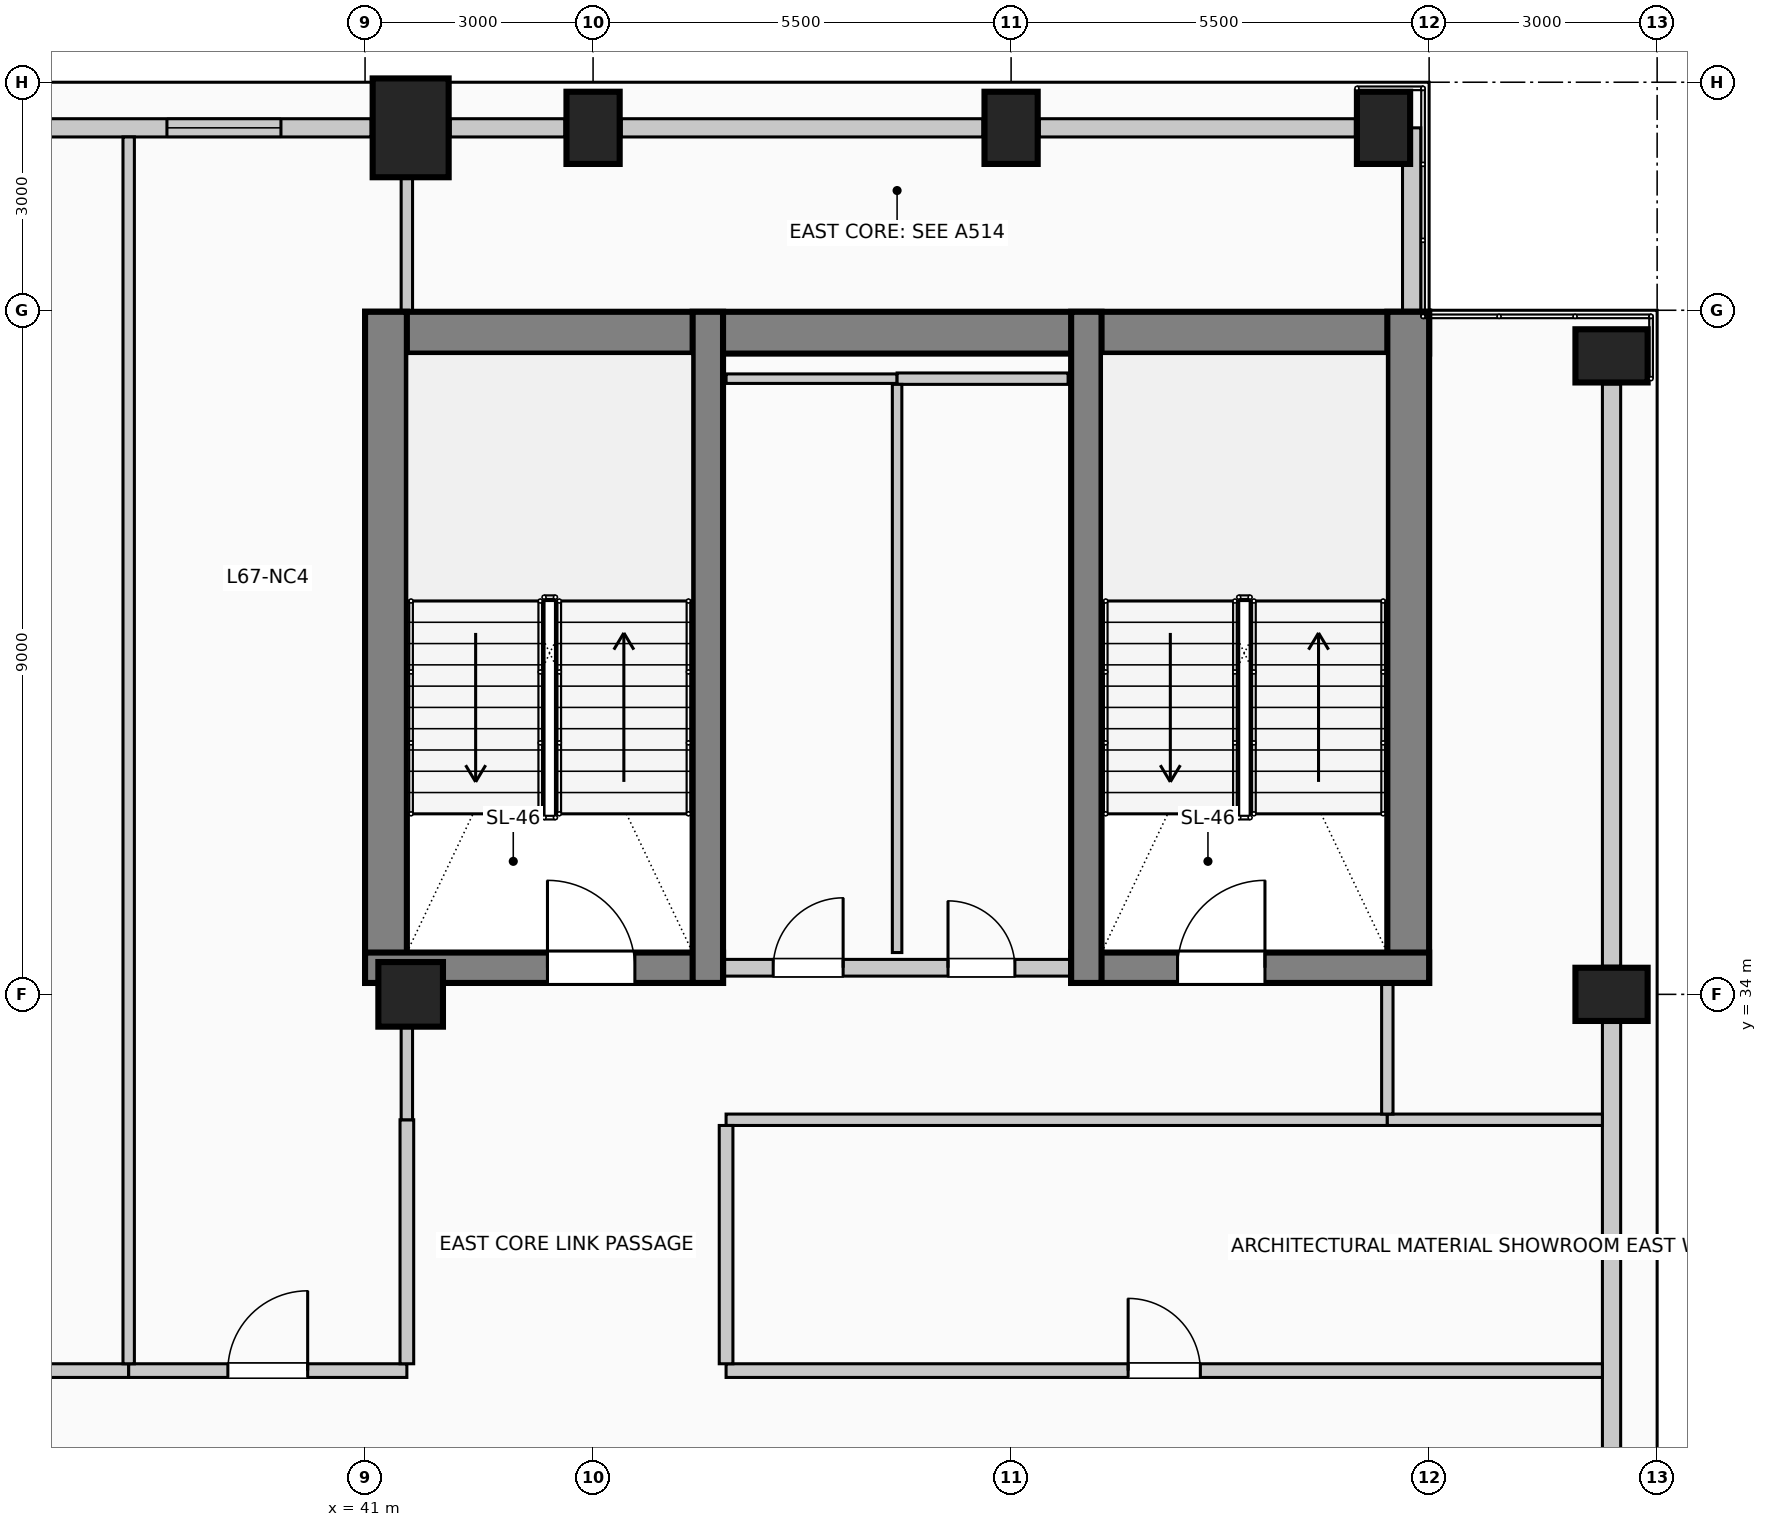
"""IFC4 building model, lengths in metres.
Left out: names, types, materials, properties, quantities, classifications, styles, units other than length and angle.
Written with IfcOpenShell. Run it as: python <this file> out.ifc"""

import sys

from ifc_helpers import new_model, si_unit, direction, frame, frame_2d, origin, origin_2d, place, context, subcontext, project, spatial, rectangle, circle, extrude, element, fill, save


model = new_model("IFC4")
c1 = context("Model", 3, precision=1e-05, world=origin(), true_north=direction((0.0, 1.0)))
c2 = subcontext(c1, "Body", "Model", "MODEL_VIEW")
j1 = project(units=[si_unit("LENGTHUNIT", "METRE"), si_unit("PLANEANGLEUNIT", "RADIAN")], contexts=[c1])
p1 = place(None, origin())
s1 = spatial("IfcSite", under=j1, at=p1, CompositionType="ELEMENT")
p2 = place(p1, origin())
s2 = spatial("IfcBuilding", under=s1, at=p2, CompositionType="ELEMENT")
p3 = place(p2, frame((0.0, 0.0, 276.6)))
s3 = spatial("IfcBuildingStorey", under=s2, at=p3, CompositionType="ELEMENT", Elevation=276.6)
p4 = place(p3, frame((41.0, 42.705, 0.0), z_axis=(0.0, 0.0, 1.0), x_axis=(1.0, 0.0, 0.0)))
e1 = element("IfcWall", 1, at=p4, inside=s3, PredefinedType="SHEAR", context=c2, shape_type="SweptSolid", body=[
    extrude(rectangle(XDim=14.0, YDim=0.55, at=frame_2d((7.0, 0.0))), origin(), (0.0, 0.0, 1.0), 4.0),
])
for number, where, z_axis, x_axis in (
    (2, (41.275, 34.15, 0.0), (0.0, 0.0, 1.0), (0.0, 1.0, 0.0)),
    (3, (54.725, 34.15, 0.0), (0.0, 0.0, 1.0), (0.0, 1.0, 0.0)),
):
    element("IfcWall", number, at=place(p3, frame(where, z_axis=z_axis, x_axis=x_axis)), inside=s3, PredefinedType="SHEAR", context=c2, shape_type="SweptSolid", body=[
        extrude(rectangle(XDim=8.83, YDim=0.55, at=frame_2d((4.415, 0.0))), origin(), (0.0, 0.0, 1.0), 4.0),
    ])
p5 = place(p3, frame((41.0, 34.35, 0.0), z_axis=(0.0, 0.0, 1.0), x_axis=(1.0, 0.0, 0.0)))
e4 = element("IfcWall", 4, at=p5, inside=s3, PredefinedType="SHEAR", context=c2, shape_type="SweptSolid", body=[
    extrude(rectangle(XDim=4.71, YDim=0.4, at=frame_2d((2.355, 0.0))), origin(), (0.0, 0.0, 1.0), 4.0),
])
p6 = place(p5, frame((2.4, 0.0, 0.0)))
e5 = element("IfcOpeningElement", 5, at=p6, cuts=e4, PredefinedType="OPENING", context=c2, shape_type="SweptSolid", body=[
    extrude(rectangle(XDim=1.15, YDim=2.2, at=frame_2d((0.575, 1.1))), frame((0.0, 0.21, 0.0), z_axis=(0.0, -1.0, 0.0), x_axis=(1.0, 0.0, 0.0)), (0.0, 0.0, 1.0), 0.42),
])
p7 = place(p3, frame((45.51, 34.15, 0.0), z_axis=(0.0, 0.0, 1.0), x_axis=(0.0, 1.0, 0.0)))
e6 = element("IfcWall", 6, at=p7, inside=s3, PredefinedType="SHEAR", context=c2, shape_type="SweptSolid", body=[
    extrude(rectangle(XDim=8.83, YDim=0.4, at=frame_2d((4.415, 0.0))), origin(), (0.0, 0.0, 1.0), 4.0),
])
p8 = place(p3, frame((50.29, 34.35, 0.0), z_axis=(0.0, 0.0, 1.0), x_axis=(1.0, 0.0, 0.0)))
e7 = element("IfcWall", 7, at=p8, inside=s3, PredefinedType="SHEAR", context=c2, shape_type="SweptSolid", body=[
    extrude(rectangle(XDim=4.71, YDim=0.4, at=frame_2d((2.355, 0.0))), origin(), (0.0, 0.0, 1.0), 4.0),
])
p9 = place(p8, frame((1.4, 0.0, 0.0)))
e8 = element("IfcOpeningElement", 8, at=p9, cuts=e7, PredefinedType="OPENING", context=c2, shape_type="SweptSolid", body=[
    extrude(rectangle(XDim=1.15, YDim=2.2, at=frame_2d((0.575, 1.1))), frame((0.0, 0.21, 0.0), z_axis=(0.0, -1.0, 0.0), x_axis=(1.0, 0.0, 0.0)), (0.0, 0.0, 1.0), 0.42),
])
p10 = place(p3, frame((50.49, 34.15, 0.0), z_axis=(0.0, 0.0, 1.0), x_axis=(0.0, 1.0, 0.0)))
e9 = element("IfcWall", 9, at=p10, inside=s3, PredefinedType="SHEAR", context=c2, shape_type="SweptSolid", body=[
    extrude(rectangle(XDim=8.83, YDim=0.4, at=frame_2d((4.415, 0.0))), origin(), (0.0, 0.0, 1.0), 4.0),
])
p11 = place(p3, frame((41.6, 45.4, 0.0), z_axis=(0.0, 0.0, 1.0), x_axis=(1.0, 0.0, 0.0)))
e10 = element("IfcColumn", 10, at=p11, inside=s3, PredefinedType="COLUMN", context=c2, shape_type="SweptSolid", body=[
    extrude(rectangle(XDim=1.0, YDim=1.3, at=origin_2d()), origin(), (0.0, 0.0, 1.0), 4.0),
])
for number, where, z_axis, x_axis in (
    (11, (44.0, 45.4, 0.0), (0.0, 0.0, 1.0), (1.0, 0.0, 0.0)),
    (12, (49.5, 45.4, 0.0), (0.0, 0.0, 1.0), (1.0, 0.0, 0.0)),
    (13, (54.4, 45.4, 0.0), (0.0, 0.0, 1.0), (1.0, 0.0, 0.0)),
    (14, (57.4, 34.0, 0.0), (0.0, 0.0, 1.0), (0.0, 1.0, 0.0)),
    (15, (57.4, 42.4, 0.0), (0.0, 0.0, 1.0), (0.0, 1.0, 0.0)),
):
    element("IfcColumn", number, at=place(p3, frame(where, z_axis=z_axis, x_axis=x_axis)), inside=s3, PredefinedType="COLUMN", context=c2, shape_type="SweptSolid", body=[
        extrude(rectangle(XDim=0.7, YDim=0.95, at=origin_2d()), origin(), (0.0, 0.0, 1.0), 4.0),
    ])
p12 = place(p3, frame((41.6, 34.0, 0.0), z_axis=(0.0, 0.0, 1.0), x_axis=(1.0, 0.0, 0.0)))
e16 = element("IfcColumn", 16, at=p12, inside=s3, PredefinedType="COLUMN", context=c2, shape_type="SweptSolid", body=[
    extrude(circle(Radius=0.425, at=origin_2d()), origin(), (0.0, 0.0, 1.0), 4.0),
])
p13 = place(p3, frame((34.52, 45.4, 0.0), z_axis=(0.0, 0.0, 1.0), x_axis=(1.0, 0.0, 0.0)))
e17 = element("IfcWall", 17, at=p13, inside=s3, PredefinedType="SOLIDWALL", context=c2, shape_type="SweptSolid", body=[
    extrude(rectangle(XDim=6.56, YDim=0.24, at=frame_2d((3.28, 0.0))), origin(), (0.0, 0.0, 1.0), 2.91),
])
p14 = place(p13, frame((3.873, 0.0, 0.42)))
e18 = element("IfcOpeningElement", 18, at=p14, cuts=e17, PredefinedType="OPENING", context=c2, shape_type="SweptSolid", body=[
    extrude(rectangle(XDim=1.5, YDim=2.2, at=frame_2d((0.75, 1.1))), frame((0.0, 0.13, 0.0), z_axis=(0.0, -1.0, 0.0), x_axis=(1.0, 0.0, 0.0)), (0.0, 0.0, 1.0), 0.26),
])
p15 = place(p3, frame((42.12, 45.4, 0.0), z_axis=(0.0, 0.0, 1.0), x_axis=(1.0, 0.0, 0.0)))
e19 = element("IfcWall", 19, at=p15, inside=s3, PredefinedType="SOLIDWALL", context=c2, shape_type="SweptSolid", body=[
    extrude(rectangle(XDim=1.51, YDim=0.24, at=frame_2d((0.755, 0.0))), origin(), (0.0, 0.0, 1.0), 2.91),
])
p16 = place(p3, frame((44.37, 45.4, 0.0), z_axis=(0.0, 0.0, 1.0), x_axis=(1.0, 0.0, 0.0)))
e20 = element("IfcWall", 20, at=p16, inside=s3, PredefinedType="SOLIDWALL", context=c2, shape_type="SweptSolid", body=[
    extrude(rectangle(XDim=4.76, YDim=0.24, at=frame_2d((2.38, 0.0))), origin(), (0.0, 0.0, 1.0), 2.91),
])
p17 = place(p3, frame((49.87, 45.4, 0.0), z_axis=(0.0, 0.0, 1.0), x_axis=(1.0, 0.0, 0.0)))
e21 = element("IfcWall", 21, at=p17, inside=s3, PredefinedType="SOLIDWALL", context=c2, shape_type="SweptSolid", body=[
    extrude(rectangle(XDim=4.16, YDim=0.24, at=frame_2d((2.08, 0.0))), origin(), (0.0, 0.0, 1.0), 2.91),
])
p18 = place(p3, frame((57.4, 33.63, 0.0), z_axis=(0.0, 0.0, 1.0), x_axis=(0.0, -1.0, 0.0)))
e22 = element("IfcWall", 22, at=p18, inside=s3, PredefinedType="SOLIDWALL", context=c2, shape_type="SweptSolid", body=[
    extrude(rectangle(XDim=7.26, YDim=0.24, at=frame_2d((3.63, 0.0))), origin(), (0.0, 0.0, 1.0), 2.91),
])
p19 = place(p3, frame((57.4, 42.03, 0.0), z_axis=(0.0, 0.0, 1.0), x_axis=(0.0, -1.0, 0.0)))
e23 = element("IfcWall", 23, at=p19, inside=s3, PredefinedType="SOLIDWALL", context=c2, shape_type="SweptSolid", body=[
    extrude(rectangle(XDim=7.66, YDim=0.24, at=frame_2d((3.83, 0.0))), origin(), (0.0, 0.0, 1.0), 2.91),
])
p20 = place(p3, frame((54.77, 45.4, 0.0), z_axis=(0.0, 0.0, 1.0), x_axis=(0.0, -1.0, 0.0)))
e24 = element("IfcWall", 24, at=p20, inside=s3, PredefinedType="SOLIDWALL", context=c2, shape_type="SweptSolid", body=[
    extrude(rectangle(XDim=2.415, YDim=0.24, at=frame_2d((1.208, 0.0))), origin(), (0.0, 0.0, 1.0), 3.66),
])
p21 = place(p3, frame((45.72, 34.35, 0.0), z_axis=(0.0, 0.0, 1.0), x_axis=(1.0, 0.0, 0.0)))
e25 = element("IfcWall", 25, at=p21, inside=s3, PredefinedType="PARTITIONING", context=c2, shape_type="SweptSolid", body=[
    extrude(rectangle(XDim=4.56, YDim=0.22, at=frame_2d((2.28, 0.0))), origin(), (0.0, 0.0, 1.0), 3.66),
])
p22 = place(p21, frame((0.65, 0.0, 0.0)))
e26 = element("IfcOpeningElement", 26, at=p22, cuts=e25, PredefinedType="OPENING", context=c2, shape_type="SweptSolid", body=[
    extrude(rectangle(XDim=0.92, YDim=2.1, at=frame_2d((0.46, 1.05))), frame((0.0, 0.12, 0.0), z_axis=(0.0, -1.0, 0.0), x_axis=(1.0, 0.0, 0.0)), (0.0, 0.0, 1.0), 0.24),
])
p23 = place(p21, frame((2.95, 0.0, 0.0)))
e27 = element("IfcOpeningElement", 27, at=p23, cuts=e25, PredefinedType="OPENING", context=c2, shape_type="SweptSolid", body=[
    extrude(rectangle(XDim=0.88, YDim=2.1, at=frame_2d((0.44, 1.05))), frame((0.0, 0.12, 0.0), z_axis=(0.0, -1.0, 0.0), x_axis=(1.0, 0.0, 0.0)), (0.0, 0.0, 1.0), 0.24),
])
p24 = place(p3, frame((32.33, 29.05, 0.0), z_axis=(0.0, 0.0, 1.0), x_axis=(1.0, 0.0, 0.0)))
e28 = element("IfcWall", 28, at=p24, inside=s3, PredefinedType="PARTITIONING", context=c2, shape_type="SweptSolid", body=[
    extrude(rectangle(XDim=5.56, YDim=0.18, at=frame_2d((2.78, 0.0))), origin(), (0.0, 0.0, 1.0), 3.66),
])
p25 = place(p24, frame((2.305, 0.0, 0.0)))
e29 = element("IfcOpeningElement", 29, at=p25, cuts=e28, PredefinedType="OPENING", context=c2, shape_type="SweptSolid", body=[
    extrude(rectangle(XDim=0.95, YDim=2.15, at=frame_2d((0.475, 1.075))), frame((0.0, 0.1, 0.0), z_axis=(0.0, -1.0, 0.0), x_axis=(1.0, 0.0, 0.0)), (0.0, 0.0, 1.0), 0.2),
])
p26 = place(p3, frame((37.89, 29.05, 0.0), z_axis=(0.0, 0.0, 1.0), x_axis=(1.0, 0.0, 0.0)))
e30 = element("IfcWall", 30, at=p26, inside=s3, PredefinedType="PARTITIONING", context=c2, shape_type="SweptSolid", body=[
    extrude(rectangle(XDim=3.66, YDim=0.18, at=frame_2d((1.83, 0.0))), origin(), (0.0, 0.0, 1.0), 3.66),
])
p27 = place(p26, frame((1.305, 0.0, 0.0)))
e31 = element("IfcOpeningElement", 31, at=p27, cuts=e30, PredefinedType="OPENING", context=c2, shape_type="SweptSolid", body=[
    extrude(rectangle(XDim=1.05, YDim=2.15, at=frame_2d((0.525, 1.075))), frame((0.0, 0.1, 0.0), z_axis=(0.0, -1.0, 0.0), x_axis=(1.0, 0.0, 0.0)), (0.0, 0.0, 1.0), 0.2),
])
p28 = place(p3, frame((45.75, 29.05, 0.0), z_axis=(0.0, 0.0, 1.0), x_axis=(1.0, 0.0, 0.0)))
e32 = element("IfcWall", 32, at=p28, inside=s3, PredefinedType="PARTITIONING", context=c2, shape_type="SweptSolid", body=[
    extrude(rectangle(XDim=11.53, YDim=0.18, at=frame_2d((5.765, 0.0))), origin(), (0.0, 0.0, 1.0), 3.66),
])
p29 = place(p28, frame((5.29, 0.0, 0.0)))
e33 = element("IfcOpeningElement", 33, at=p29, cuts=e32, PredefinedType="OPENING", context=c2, shape_type="SweptSolid", body=[
    extrude(rectangle(XDim=0.95, YDim=2.15, at=frame_2d((0.475, 1.075))), frame((0.0, 0.1, 0.0), z_axis=(0.0, -1.0, 0.0), x_axis=(1.0, 0.0, 0.0)), (0.0, 0.0, 1.0), 0.2),
])
p30 = place(p3, frame((45.75, 32.35, 0.0), z_axis=(0.0, 0.0, 1.0), x_axis=(1.0, 0.0, 0.0)))
e34 = element("IfcWall", 34, at=p30, inside=s3, PredefinedType="PARTITIONING", context=c2, shape_type="SweptSolid", body=[
    extrude(rectangle(XDim=8.7, YDim=0.15, at=frame_2d((4.35, 0.0))), origin(), (0.0, 0.0, 1.0), 3.66),
])
p31 = place(p3, frame((54.45, 32.35, 0.0), z_axis=(0.0, 0.0, 1.0), x_axis=(1.0, 0.0, 0.0)))
e35 = element("IfcWall", 35, at=p31, inside=s3, PredefinedType="PARTITIONING", context=c2, shape_type="SweptSolid", body=[
    extrude(rectangle(XDim=2.83, YDim=0.15, at=frame_2d((1.415, 0.0))), origin(), (0.0, 0.0, 1.0), 3.66),
])
p32 = place(p3, frame((45.75, 42.1, 0.0), z_axis=(0.0, 0.0, 1.0), x_axis=(1.0, 0.0, 0.0)))
e36 = element("IfcWall", 36, at=p32, inside=s3, PredefinedType="PARTITIONING", context=c2, shape_type="SweptSolid", body=[
    extrude(rectangle(XDim=2.25, YDim=0.125, at=frame_2d((1.125, 0.0))), origin(), (0.0, 0.0, 1.0), 3.66),
])
p33 = place(p3, frame((48.0, 42.1, 0.0), z_axis=(0.0, 0.0, 1.0), x_axis=(1.0, 0.0, 0.0)))
e37 = element("IfcWall", 37, at=p33, inside=s3, PredefinedType="PARTITIONING", context=c2, shape_type="SweptSolid", body=[
    extrude(rectangle(XDim=2.25, YDim=0.15, at=frame_2d((1.125, 0.0))), origin(), (0.0, 0.0, 1.0), 3.66),
])
p34 = place(p3, frame((37.89, 29.14, 0.0), z_axis=(0.0, 0.0, 1.0), x_axis=(0.0, 1.0, 0.0)))
e38 = element("IfcWall", 38, at=p34, inside=s3, PredefinedType="PARTITIONING", context=c2, shape_type="SweptSolid", body=[
    extrude(rectangle(XDim=16.14, YDim=0.15, at=frame_2d((8.07, 0.0))), origin(), (0.0, 0.0, 1.0), 3.66),
])
p35 = place(p3, frame((41.55, 29.14, 0.0), z_axis=(0.0, 0.0, 1.0), x_axis=(0.0, 1.0, 0.0)))
e39 = element("IfcWall", 39, at=p35, inside=s3, PredefinedType="PARTITIONING", context=c2, shape_type="SweptSolid", body=[
    extrude(rectangle(XDim=3.21, YDim=0.18, at=frame_2d((1.605, 0.0))), origin(), (0.0, 0.0, 1.0), 3.105),
])
p36 = place(p3, frame((41.55, 32.35, 0.0), z_axis=(0.0, 0.0, 1.0), x_axis=(0.0, 1.0, 0.0)))
e40 = element("IfcWall", 40, at=p36, inside=s3, PredefinedType="PARTITIONING", context=c2, shape_type="SweptSolid", body=[
    extrude(rectangle(XDim=1.225, YDim=0.15, at=frame_2d((0.612, 0.0))), origin(), (0.0, 0.0, 1.0), 3.105),
])
p37 = place(p3, frame((41.55, 42.98, 0.0), z_axis=(0.0, 0.0, 1.0), x_axis=(0.0, 1.0, 0.0)))
e41 = element("IfcWall", 41, at=p37, inside=s3, PredefinedType="PARTITIONING", context=c2, shape_type="SweptSolid", body=[
    extrude(rectangle(XDim=1.77, YDim=0.15, at=frame_2d((0.885, 0.0))), origin(), (0.0, 0.0, 1.0), 3.66),
])
p38 = place(p3, frame((45.75, 29.14, 0.0), z_axis=(0.0, 0.0, 1.0), x_axis=(0.0, 1.0, 0.0)))
e42 = element("IfcWall", 42, at=p38, inside=s3, PredefinedType="PARTITIONING", context=c2, shape_type="SweptSolid", body=[
    extrude(rectangle(XDim=3.135, YDim=0.18, at=frame_2d((1.567, 0.0))), origin(), (0.0, 0.0, 1.0), 3.66),
])
p39 = place(p3, frame((48.0, 34.55, 0.0), z_axis=(0.0, 0.0, 1.0), x_axis=(0.0, 1.0, 0.0)))
e43 = element("IfcWall", 43, at=p39, inside=s3, PredefinedType="PARTITIONING", context=c2, shape_type="SweptSolid", body=[
    extrude(rectangle(XDim=7.475, YDim=0.125, at=frame_2d((3.737, 0.0))), origin(), (0.0, 0.0, 1.0), 3.66),
])
p40 = place(p3, frame((54.45, 32.425, 0.0), z_axis=(0.0, 0.0, 1.0), x_axis=(0.0, 1.0, 0.0)))
e44 = element("IfcWall", 44, at=p40, inside=s3, PredefinedType="PARTITIONING", context=c2, shape_type="SweptSolid", body=[
    extrude(rectangle(XDim=1.725, YDim=0.15, at=frame_2d((0.862, 0.0))), origin(), (0.0, 0.0, 1.0), 3.66),
])
p41 = place(p14, origin())
e45 = element("IfcWindow", 45, at=p41, inside=s3, PartitioningType="SINGLE_PANEL", PredefinedType="WINDOW", context=c2, shape_type="SweptSolid", body=[
    extrude(rectangle(XDim=1.5, YDim=2.2, at=frame_2d((0.75, 1.1))), frame((0.0, 0.03, 0.0), z_axis=(0.0, -1.0, 0.0), x_axis=(1.0, 0.0, 0.0)), (0.0, 0.0, 1.0), 0.06),
])
fill(e18, e45)
p42 = place(p6, origin())
e46 = element("IfcDoor", 46, at=p42, inside=s3, OperationType="SINGLE_SWING_LEFT", PredefinedType="DOOR", context=c2, shape_type="SweptSolid", body=[
    extrude(rectangle(XDim=1.15, YDim=2.2, at=frame_2d((0.575, 1.1))), frame((0.0, 0.025, 0.0), z_axis=(0.0, -1.0, 0.0), x_axis=(1.0, 0.0, 0.0)), (0.0, 0.0, 1.0), 0.05),
])
fill(e5, e46)
p43 = place(p22, origin())
e47 = element("IfcDoor", 47, at=p43, inside=s3, OperationType="SINGLE_SWING_RIGHT", PredefinedType="DOOR", context=c2, shape_type="SweptSolid", body=[
    extrude(rectangle(XDim=0.92, YDim=2.1, at=frame_2d((0.46, 1.05))), frame((0.0, 0.025, 0.0), z_axis=(0.0, -1.0, 0.0), x_axis=(1.0, 0.0, 0.0)), (0.0, 0.0, 1.0), 0.05),
])
fill(e26, e47)
p44 = place(p23, origin())
e48 = element("IfcDoor", 48, at=p44, inside=s3, OperationType="SINGLE_SWING_LEFT", PredefinedType="DOOR", context=c2, shape_type="SweptSolid", body=[
    extrude(rectangle(XDim=0.88, YDim=2.1, at=frame_2d((0.44, 1.05))), frame((0.0, 0.025, 0.0), z_axis=(0.0, -1.0, 0.0), x_axis=(1.0, 0.0, 0.0)), (0.0, 0.0, 1.0), 0.05),
])
fill(e27, e48)
p45 = place(p9, origin())
e49 = element("IfcDoor", 49, at=p45, inside=s3, OperationType="SINGLE_SWING_RIGHT", PredefinedType="DOOR", context=c2, shape_type="SweptSolid", body=[
    extrude(rectangle(XDim=1.15, YDim=2.2, at=frame_2d((0.575, 1.1))), frame((0.0, 0.025, 0.0), z_axis=(0.0, -1.0, 0.0), x_axis=(1.0, 0.0, 0.0)), (0.0, 0.0, 1.0), 0.05),
])
fill(e8, e49)
p46 = place(p27, origin())
e50 = element("IfcDoor", 50, at=p46, inside=s3, OperationType="SINGLE_SWING_RIGHT", PredefinedType="DOOR", context=c2, shape_type="SweptSolid", body=[
    extrude(rectangle(XDim=1.05, YDim=2.15, at=frame_2d((0.525, 1.075))), frame((0.0, 0.025, 0.0), z_axis=(0.0, -1.0, 0.0), x_axis=(1.0, 0.0, 0.0)), (0.0, 0.0, 1.0), 0.05),
])
fill(e31, e50)
p47 = place(p29, origin())
e51 = element("IfcDoor", 51, at=p47, inside=s3, OperationType="SINGLE_SWING_LEFT", PredefinedType="DOOR", context=c2, shape_type="SweptSolid", body=[
    extrude(rectangle(XDim=0.95, YDim=2.15, at=frame_2d((0.475, 1.075))), frame((0.0, 0.025, 0.0), z_axis=(0.0, -1.0, 0.0), x_axis=(1.0, 0.0, 0.0)), (0.0, 0.0, 1.0), 0.05),
])
fill(e33, e51)
save(model, sys.argv[1])
